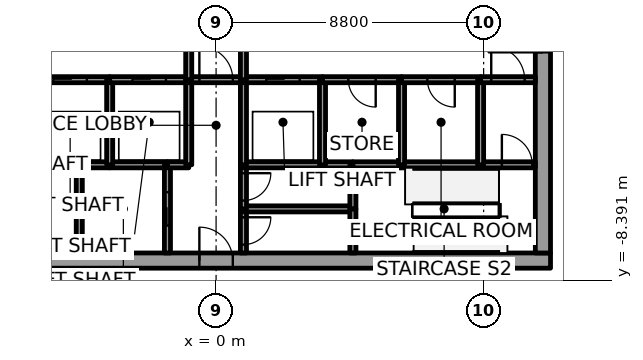
"""IFC4 building model, lengths in metres.
Left out: names, types, materials, properties, quantities, classifications, styles, units other than length and angle.
Written with IfcOpenShell. Run it as: python <this file> out.ifc"""

import sys

from ifc_helpers import new_model, si_unit, direction, frame, frame_2d, origin, place, context, subcontext, project, spatial, rectangle, extrude, element, fill, save


model = new_model("IFC4")
c1 = context("Model", 3, precision=1e-05, world=origin(), true_north=direction((0.0, 1.0)))
c2 = subcontext(c1, "Body", "Model", "MODEL_VIEW")
j1 = project(units=[si_unit("LENGTHUNIT", "METRE"), si_unit("PLANEANGLEUNIT", "RADIAN")], contexts=[c1])
p1 = place(None, origin())
s1 = spatial("IfcSite", under=j1, at=p1, CompositionType="ELEMENT")
p2 = place(p1, origin())
s2 = spatial("IfcBuilding", under=s1, at=p2, CompositionType="ELEMENT")
p3 = place(p2, frame((0.0, 0.0, 9.0)))
s3 = spatial("IfcBuildingStorey", under=s2, at=p3, CompositionType="ELEMENT", Elevation=9.0)
p4 = place(p3, frame((-11.0, -7.75, 0.0), z_axis=(0.0, 0.0, 1.0), x_axis=(1.0, 0.0, 0.0)))
e1 = element("IfcWall", 1, at=p4, inside=s3, PredefinedType="SHEAR", context=c2, shape_type="SweptSolid", body=[
    extrude(rectangle(XDim=22.0, YDim=0.5, at=frame_2d((11.0, 0.0))), origin(), (0.0, 0.0, 1.0), 7.8),
])
p5 = place(p4, frame((10.45, 0.0, 0.0)))
e2 = element("IfcOpeningElement", 2, at=p5, cuts=e1, PredefinedType="OPENING", context=c2, shape_type="SweptSolid", body=[
    extrude(rectangle(XDim=1.1, YDim=2.1, at=frame_2d((0.55, 1.05))), frame((0.0, 0.25, 0.0), z_axis=(0.0, -1.0, 0.0), x_axis=(1.0, 0.0, 0.0)), (0.0, 0.0, 1.0), 0.5),
])
p6 = place(p3, frame((10.75, -7.5, 0.0), z_axis=(0.0, 0.0, 1.0), x_axis=(0.0, 1.0, 0.0)))
e3 = element("IfcWall", 3, at=p6, inside=s3, PredefinedType="SHEAR", context=c2, shape_type="SweptSolid", body=[
    extrude(rectangle(XDim=15.0, YDim=0.5, at=frame_2d((7.5, 0.0))), origin(), (0.0, 0.0, 1.0), 7.8),
])
p7 = place(p6, frame((6.6, 0.0, 0.0)))
e4 = element("IfcOpeningElement", 4, at=p7, cuts=e3, PredefinedType="OPENING", context=c2, shape_type="SweptSolid", body=[
    extrude(rectangle(XDim=1.8, YDim=2.1, at=frame_2d((0.9, 1.05))), frame((0.0, 0.25, 0.0), z_axis=(0.0, -1.0, 0.0), x_axis=(1.0, 0.0, 0.0)), (0.0, 0.0, 1.0), 0.5),
])
p8 = place(p3, frame((-6.1, -4.6, 0.0), z_axis=(0.0, 0.0, 1.0), x_axis=(1.0, 0.0, 0.0)))
e5 = element("IfcWall", 5, at=p8, inside=s3, PredefinedType="SOLIDWALL", context=c2, shape_type="SweptSolid", body=[
    extrude(rectangle(XDim=1.6, YDim=0.2, at=frame_2d((0.8, 0.0))), origin(), (0.0, 0.0, 1.0), 7.55),
])
p9 = place(p3, frame((-6.1, -1.8, 0.0), z_axis=(0.0, 0.0, 1.0), x_axis=(1.0, 0.0, 0.0)))
e6 = element("IfcWall", 6, at=p9, inside=s3, PredefinedType="SOLIDWALL", context=c2, shape_type="SweptSolid", body=[
    extrude(rectangle(XDim=2.6, YDim=0.2, at=frame_2d((1.3, 0.0))), origin(), (0.0, 0.0, 1.0), 7.55),
])
p10 = place(p9, frame((0.75, 0.0, 0.0)))
e7 = element("IfcOpeningElement", 7, at=p10, cuts=e6, PredefinedType="OPENING", context=c2, shape_type="SweptSolid", body=[
    extrude(rectangle(XDim=1.1, YDim=2.1, at=frame_2d((0.55, 1.05))), frame((0.0, 0.1, 0.0), z_axis=(0.0, -1.0, 0.0), x_axis=(1.0, 0.0, 0.0)), (0.0, 0.0, 1.0), 0.2),
])
p11 = place(p3, frame((-4.5, -4.6, 0.0), z_axis=(0.0, 0.0, 1.0), x_axis=(0.0, -1.0, 0.0)))
e8 = element("IfcWall", 8, at=p11, inside=s3, PredefinedType="SOLIDWALL", context=c2, shape_type="SweptSolid", body=[
    extrude(rectangle(XDim=2.9, YDim=0.2, at=frame_2d((1.45, 0.0))), origin(), (0.0, 0.0, 1.0), 7.55),
])
p12 = place(p3, frame((-4.5, -4.6, 0.0), z_axis=(0.0, 0.0, 1.0), x_axis=(1.0, 0.0, 0.0)))
e9 = element("IfcWall", 9, at=p12, inside=s3, PredefinedType="SOLIDWALL", context=c2, shape_type="SweptSolid", body=[
    extrude(rectangle(XDim=1.0, YDim=0.2, at=frame_2d((0.5, 0.0))), origin(), (0.0, 0.0, 1.0), 7.55),
])
p13 = place(p3, frame((-3.5, -4.6, 0.0), z_axis=(0.0, 0.0, 1.0), x_axis=(1.0, 0.0, 0.0)))
e10 = element("IfcWall", 10, at=p13, inside=s3, PredefinedType="SOLIDWALL", context=c2, shape_type="SweptSolid", body=[
    extrude(rectangle(XDim=1.9, YDim=0.2, at=frame_2d((0.95, 0.0))), origin(), (0.0, 0.0, 1.0), 7.55),
])
p14 = place(p3, frame((-3.5, -4.6, 0.0), z_axis=(0.0, 0.0, 1.0), x_axis=(0.0, 1.0, 0.0)))
e11 = element("IfcWall", 11, at=p14, inside=s3, PredefinedType="SOLIDWALL", context=c2, shape_type="SweptSolid", body=[
    extrude(rectangle(XDim=2.8, YDim=0.2, at=frame_2d((1.4, 0.0))), origin(), (0.0, 0.0, 1.0), 7.55),
])
p15 = place(p3, frame((-3.5, -1.8, 0.0), z_axis=(0.0, 0.0, 1.0), x_axis=(1.0, 0.0, 0.0)))
e12 = element("IfcWall", 12, at=p15, inside=s3, PredefinedType="SOLIDWALL", context=c2, shape_type="SweptSolid", body=[
    extrude(rectangle(XDim=2.6, YDim=0.2, at=frame_2d((1.3, 0.0))), origin(), (0.0, 0.0, 1.0), 7.55),
])
p16 = place(p15, frame((0.75, 0.0, 0.0)))
e13 = element("IfcOpeningElement", 13, at=p16, cuts=e12, PredefinedType="OPENING", context=c2, shape_type="SweptSolid", body=[
    extrude(rectangle(XDim=1.1, YDim=2.1, at=frame_2d((0.55, 1.05))), frame((0.0, 0.1, 0.0), z_axis=(0.0, -1.0, 0.0), x_axis=(1.0, 0.0, 0.0)), (0.0, 0.0, 1.0), 0.2),
])
p17 = place(p3, frame((-1.6, -7.5, 0.0), z_axis=(0.0, 0.0, 1.0), x_axis=(0.0, 1.0, 0.0)))
e14 = element("IfcWall", 14, at=p17, inside=s3, PredefinedType="SOLIDWALL", context=c2, shape_type="SweptSolid", body=[
    extrude(rectangle(XDim=2.9, YDim=0.2, at=frame_2d((1.45, 0.0))), origin(), (0.0, 0.0, 1.0), 7.55),
])
p18 = place(p17, frame((0.9, 0.0, 0.0)))
e15 = element("IfcOpeningElement", 15, at=p18, cuts=e14, PredefinedType="OPENING", context=c2, shape_type="SweptSolid", body=[
    extrude(rectangle(XDim=1.1, YDim=2.1, at=frame_2d((0.55, 1.05))), frame((0.0, 0.1, 0.0), z_axis=(0.0, -1.0, 0.0), x_axis=(1.0, 0.0, 0.0)), (0.0, 0.0, 1.0), 0.2),
])
p19 = place(p3, frame((-1.6, -4.6, 0.0), z_axis=(0.0, 0.0, 1.0), x_axis=(1.0, 0.0, 0.0)))
e16 = element("IfcWall", 16, at=p19, inside=s3, PredefinedType="SOLIDWALL", context=c2, shape_type="SweptSolid", body=[
    extrude(rectangle(XDim=0.7, YDim=0.2, at=frame_2d((0.35, 0.0))), origin(), (0.0, 0.0, 1.0), 7.55),
])
p20 = place(p3, frame((-0.9, -4.6, 0.0), z_axis=(0.0, 0.0, 1.0), x_axis=(0.0, 1.0, 0.0)))
e17 = element("IfcWall", 17, at=p20, inside=s3, PredefinedType="SOLIDWALL", context=c2, shape_type="SweptSolid", body=[
    extrude(rectangle(XDim=2.8, YDim=0.2, at=frame_2d((1.4, 0.0))), origin(), (0.0, 0.0, 1.0), 7.55),
])
p21 = place(p3, frame((-0.9, -1.8, 0.0), z_axis=(0.0, 0.0, 1.0), x_axis=(1.0, 0.0, 0.0)))
e18 = element("IfcWall", 18, at=p21, inside=s3, PredefinedType="SOLIDWALL", context=c2, shape_type="SweptSolid", body=[
    extrude(rectangle(XDim=1.8, YDim=0.2, at=frame_2d((0.9, 0.0))), origin(), (0.0, 0.0, 1.0), 7.55),
])
p22 = place(p21, frame((0.35, 0.0, 0.0)))
e19 = element("IfcOpeningElement", 19, at=p22, cuts=e18, PredefinedType="OPENING", context=c2, shape_type="SweptSolid", body=[
    extrude(rectangle(XDim=1.1, YDim=2.4, at=frame_2d((0.55, 1.2))), frame((0.0, 0.1, 0.0), z_axis=(0.0, -1.0, 0.0), x_axis=(1.0, 0.0, 0.0)), (0.0, 0.0, 1.0), 0.2),
])
p23 = place(p3, frame((-0.9, 1.8, 0.0), z_axis=(0.0, 0.0, 1.0), x_axis=(0.0, -1.0, 0.0)))
e20 = element("IfcWall", 20, at=p23, inside=s3, PredefinedType="SOLIDWALL", context=c2, shape_type="SweptSolid", body=[
    extrude(rectangle(XDim=3.6, YDim=0.2, at=frame_2d((1.8, 0.0))), origin(), (0.0, 0.0, 1.0), 7.55),
])
p24 = place(p23, frame((1.05, 0.0, 0.0)))
e21 = element("IfcOpeningElement", 21, at=p24, cuts=e20, PredefinedType="OPENING", context=c2, shape_type="SweptSolid", body=[
    extrude(rectangle(XDim=1.5, YDim=2.4, at=frame_2d((0.75, 1.2))), frame((0.0, 0.1, 0.0), z_axis=(0.0, -1.0, 0.0), x_axis=(1.0, 0.0, 0.0)), (0.0, 0.0, 1.0), 0.2),
])
p25 = place(p3, frame((0.9, -6.05, 0.0), z_axis=(0.0, 0.0, 1.0), x_axis=(0.0, -1.0, 0.0)))
e22 = element("IfcWall", 22, at=p25, inside=s3, PredefinedType="SOLIDWALL", context=c2, shape_type="SweptSolid", body=[
    extrude(rectangle(XDim=1.45, YDim=0.2, at=frame_2d((0.725, 0.0))), origin(), (0.0, 0.0, 1.0), 7.55),
])
p26 = place(p25, frame((0.275, 0.0, 0.0)))
e23 = element("IfcOpeningElement", 23, at=p26, cuts=e22, PredefinedType="OPENING", context=c2, shape_type="SweptSolid", body=[
    extrude(rectangle(XDim=0.9, YDim=2.4, at=frame_2d((0.45, 1.2))), frame((0.0, 0.1, 0.0), z_axis=(0.0, -1.0, 0.0), x_axis=(1.0, 0.0, 0.0)), (0.0, 0.0, 1.0), 0.2),
])
p27 = place(p3, frame((4.5, -6.05, 0.0), z_axis=(0.0, 0.0, 1.0), x_axis=(-1.0, 0.0, 0.0)))
e24 = element("IfcWall", 24, at=p27, inside=s3, PredefinedType="SOLIDWALL", context=c2, shape_type="SweptSolid", body=[
    extrude(rectangle(XDim=3.6, YDim=0.2, at=frame_2d((1.8, 0.0))), origin(), (0.0, 0.0, 1.0), 7.55),
])
p28 = place(p3, frame((0.9, -4.6, 0.0), z_axis=(0.0, 0.0, 1.0), x_axis=(0.0, -1.0, 0.0)))
e25 = element("IfcWall", 25, at=p28, inside=s3, PredefinedType="SOLIDWALL", context=c2, shape_type="SweptSolid", body=[
    extrude(rectangle(XDim=1.45, YDim=0.2, at=frame_2d((0.725, 0.0))), origin(), (0.0, 0.0, 1.0), 7.55),
])
p29 = place(p28, frame((0.275, 0.0, 0.0)))
e26 = element("IfcOpeningElement", 26, at=p29, cuts=e25, PredefinedType="OPENING", context=c2, shape_type="SweptSolid", body=[
    extrude(rectangle(XDim=0.9, YDim=2.4, at=frame_2d((0.45, 1.2))), frame((0.0, 0.1, 0.0), z_axis=(0.0, -1.0, 0.0), x_axis=(1.0, 0.0, 0.0)), (0.0, 0.0, 1.0), 0.2),
])
p30 = place(p3, frame((3.5, -4.6, 0.0), z_axis=(0.0, 0.0, 1.0), x_axis=(-1.0, 0.0, 0.0)))
e27 = element("IfcWall", 27, at=p30, inside=s3, PredefinedType="SOLIDWALL", context=c2, shape_type="SweptSolid", body=[
    extrude(rectangle(XDim=2.6, YDim=0.2, at=frame_2d((1.3, 0.0))), origin(), (0.0, 0.0, 1.0), 7.55),
])
p31 = place(p3, frame((0.9, -1.8, 0.0), z_axis=(0.0, 0.0, 1.0), x_axis=(0.0, -1.0, 0.0)))
e28 = element("IfcWall", 28, at=p31, inside=s3, PredefinedType="SOLIDWALL", context=c2, shape_type="SweptSolid", body=[
    extrude(rectangle(XDim=2.8, YDim=0.2, at=frame_2d((1.4, 0.0))), origin(), (0.0, 0.0, 1.0), 7.55),
])
p32 = place(p3, frame((0.9, -1.8, 0.0), z_axis=(0.0, 0.0, 1.0), x_axis=(1.0, 0.0, 0.0)))
e29 = element("IfcWall", 29, at=p32, inside=s3, PredefinedType="SOLIDWALL", context=c2, shape_type="SweptSolid", body=[
    extrude(rectangle(XDim=2.6, YDim=0.2, at=frame_2d((1.3, 0.0))), origin(), (0.0, 0.0, 1.0), 7.55),
])
p33 = place(p32, frame((0.75, 0.0, 0.0)))
e30 = element("IfcOpeningElement", 30, at=p33, cuts=e29, PredefinedType="OPENING", context=c2, shape_type="SweptSolid", body=[
    extrude(rectangle(XDim=1.1, YDim=2.1, at=frame_2d((0.55, 1.05))), frame((0.0, 0.1, 0.0), z_axis=(0.0, -1.0, 0.0), x_axis=(1.0, 0.0, 0.0)), (0.0, 0.0, 1.0), 0.2),
])
p34 = place(p3, frame((0.9, -1.8, 0.0), z_axis=(0.0, 0.0, 1.0), x_axis=(0.0, 1.0, 0.0)))
e31 = element("IfcWall", 31, at=p34, inside=s3, PredefinedType="SOLIDWALL", context=c2, shape_type="SweptSolid", body=[
    extrude(rectangle(XDim=3.6, YDim=0.2, at=frame_2d((1.8, 0.0))), origin(), (0.0, 0.0, 1.0), 7.55),
])
p35 = place(p34, frame((1.05, 0.0, 0.0)))
e32 = element("IfcOpeningElement", 32, at=p35, cuts=e31, PredefinedType="OPENING", context=c2, shape_type="SweptSolid", body=[
    extrude(rectangle(XDim=1.5, YDim=2.4, at=frame_2d((0.75, 1.2))), frame((0.0, 0.1, 0.0), z_axis=(0.0, -1.0, 0.0), x_axis=(1.0, 0.0, 0.0)), (0.0, 0.0, 1.0), 0.2),
])
p36 = place(p3, frame((3.5, -4.6, 0.0), z_axis=(0.0, 0.0, 1.0), x_axis=(1.0, 0.0, 0.0)))
e33 = element("IfcWall", 33, at=p36, inside=s3, PredefinedType="SOLIDWALL", context=c2, shape_type="SweptSolid", body=[
    extrude(rectangle(XDim=1.0, YDim=0.2, at=frame_2d((0.5, 0.0))), origin(), (0.0, 0.0, 1.0), 7.55),
])
p37 = place(p3, frame((3.5, -1.8, 0.0), z_axis=(0.0, 0.0, 1.0), x_axis=(0.0, -1.0, 0.0)))
e34 = element("IfcWall", 34, at=p37, inside=s3, PredefinedType="SOLIDWALL", context=c2, shape_type="SweptSolid", body=[
    extrude(rectangle(XDim=2.8, YDim=0.2, at=frame_2d((1.4, 0.0))), origin(), (0.0, 0.0, 1.0), 7.55),
])
p38 = place(p3, frame((6.1, -1.8, 0.0), z_axis=(0.0, 0.0, 1.0), x_axis=(-1.0, 0.0, 0.0)))
e35 = element("IfcWall", 35, at=p38, inside=s3, PredefinedType="SOLIDWALL", context=c2, shape_type="SweptSolid", body=[
    extrude(rectangle(XDim=2.6, YDim=0.2, at=frame_2d((1.3, 0.0))), origin(), (0.0, 0.0, 1.0), 7.55),
])
p39 = place(p38, frame((0.85, 0.0, 0.0)))
e36 = element("IfcOpeningElement", 36, at=p39, cuts=e35, PredefinedType="OPENING", context=c2, shape_type="SweptSolid", body=[
    extrude(rectangle(XDim=0.9, YDim=2.4, at=frame_2d((0.45, 1.2))), frame((0.0, 0.1, 0.0), z_axis=(0.0, -1.0, 0.0), x_axis=(1.0, 0.0, 0.0)), (0.0, 0.0, 1.0), 0.2),
])
for number, where, z_axis, x_axis in (
    (37, (4.5, -7.5, 0.0), (0.0, 0.0, 1.0), (0.0, 1.0, 0.0)),
    (38, (4.5, -6.05, 0.0), (0.0, 0.0, 1.0), (0.0, 1.0, 0.0)),
):
    element("IfcWall", number, at=place(p3, frame(where, z_axis=z_axis, x_axis=x_axis)), inside=s3, PredefinedType="SOLIDWALL", context=c2, shape_type="SweptSolid", body=[
        extrude(rectangle(XDim=1.45, YDim=0.2, at=frame_2d((0.725, 0.0))), origin(), (0.0, 0.0, 1.0), 7.55),
    ])
p40 = place(p3, frame((4.5, -4.6, 0.0), z_axis=(0.0, 0.0, 1.0), x_axis=(1.0, 0.0, 0.0)))
e39 = element("IfcWall", 39, at=p40, inside=s3, PredefinedType="SOLIDWALL", context=c2, shape_type="SweptSolid", body=[
    extrude(rectangle(XDim=1.6, YDim=0.2, at=frame_2d((0.8, 0.0))), origin(), (0.0, 0.0, 1.0), 7.55),
])
p41 = place(p3, frame((6.1, -4.6, 0.0), z_axis=(0.0, 0.0, 1.0), x_axis=(1.0, 0.0, 0.0)))
e40 = element("IfcWall", 40, at=p41, inside=s3, PredefinedType="SOLIDWALL", context=c2, shape_type="SweptSolid", body=[
    extrude(rectangle(XDim=2.6, YDim=0.2, at=frame_2d((1.3, 0.0))), origin(), (0.0, 0.0, 1.0), 7.55),
])
p42 = place(p3, frame((6.1, -4.6, 0.0), z_axis=(0.0, 0.0, 1.0), x_axis=(0.0, 1.0, 0.0)))
e41 = element("IfcWall", 41, at=p42, inside=s3, PredefinedType="SOLIDWALL", context=c2, shape_type="SweptSolid", body=[
    extrude(rectangle(XDim=2.8, YDim=0.2, at=frame_2d((1.4, 0.0))), origin(), (0.0, 0.0, 1.0), 7.55),
])
p43 = place(p3, frame((8.7, -1.8, 0.0), z_axis=(0.0, 0.0, 1.0), x_axis=(-1.0, 0.0, 0.0)))
e42 = element("IfcWall", 42, at=p43, inside=s3, PredefinedType="SOLIDWALL", context=c2, shape_type="SweptSolid", body=[
    extrude(rectangle(XDim=2.6, YDim=0.2, at=frame_2d((1.3, 0.0))), origin(), (0.0, 0.0, 1.0), 7.55),
])
p44 = place(p43, frame((0.85, 0.0, 0.0)))
e43 = element("IfcOpeningElement", 43, at=p44, cuts=e42, PredefinedType="OPENING", context=c2, shape_type="SweptSolid", body=[
    extrude(rectangle(XDim=0.9, YDim=2.4, at=frame_2d((0.45, 1.2))), frame((0.0, 0.1, 0.0), z_axis=(0.0, -1.0, 0.0), x_axis=(1.0, 0.0, 0.0)), (0.0, 0.0, 1.0), 0.2),
])
p45 = place(p3, frame((8.7, -4.6, 0.0), z_axis=(0.0, 0.0, 1.0), x_axis=(1.0, 0.0, 0.0)))
e44 = element("IfcWall", 44, at=p45, inside=s3, PredefinedType="SOLIDWALL", context=c2, shape_type="SweptSolid", body=[
    extrude(rectangle(XDim=1.8, YDim=0.2, at=frame_2d((0.9, 0.0))), origin(), (0.0, 0.0, 1.0), 7.55),
])
p46 = place(p45, frame((0.7, 0.0, 0.0)))
e45 = element("IfcOpeningElement", 45, at=p46, cuts=e44, PredefinedType="OPENING", context=c2, shape_type="SweptSolid", body=[
    extrude(rectangle(XDim=1.0, YDim=2.1, at=frame_2d((0.5, 1.05))), frame((0.0, 0.1, 0.0), z_axis=(0.0, -1.0, 0.0), x_axis=(1.0, 0.0, 0.0)), (0.0, 0.0, 1.0), 0.2),
])
p47 = place(p3, frame((8.7, -4.6, 0.0), z_axis=(0.0, 0.0, 1.0), x_axis=(0.0, 1.0, 0.0)))
e46 = element("IfcWall", 46, at=p47, inside=s3, PredefinedType="SOLIDWALL", context=c2, shape_type="SweptSolid", body=[
    extrude(rectangle(XDim=2.8, YDim=0.2, at=frame_2d((1.4, 0.0))), origin(), (0.0, 0.0, 1.0), 7.55),
])
p48 = place(p3, frame((8.7, -1.8, 0.0), z_axis=(0.0, 0.0, 1.0), x_axis=(1.0, 0.0, 0.0)))
e47 = element("IfcWall", 47, at=p48, inside=s3, PredefinedType="SOLIDWALL", context=c2, shape_type="SweptSolid", body=[
    extrude(rectangle(XDim=1.8, YDim=0.2, at=frame_2d((0.9, 0.0))), origin(), (0.0, 0.0, 1.0), 7.55),
])
p49 = place(p48, frame((0.35, 0.0, 0.0)))
e48 = element("IfcOpeningElement", 48, at=p49, cuts=e47, PredefinedType="OPENING", context=c2, shape_type="SweptSolid", body=[
    extrude(rectangle(XDim=1.1, YDim=2.4, at=frame_2d((0.55, 1.2))), frame((0.0, 0.1, 0.0), z_axis=(0.0, -1.0, 0.0), x_axis=(1.0, 0.0, 0.0)), (0.0, 0.0, 1.0), 0.2),
])
p50 = place(p10, origin())
e49 = element("IfcDoor", 49, at=p50, inside=s3, OperationType="SLIDING_TO_LEFT", PredefinedType="DOOR", context=c2, shape_type="SweptSolid", body=[
    extrude(rectangle(XDim=1.1, YDim=2.1, at=frame_2d((0.55, 1.05))), frame((0.0, 0.025, 0.0), z_axis=(0.0, -1.0, 0.0), x_axis=(1.0, 0.0, 0.0)), (0.0, 0.0, 1.0), 0.05),
])
fill(e7, e49)
p51 = place(p16, origin())
e50 = element("IfcDoor", 50, at=p51, inside=s3, OperationType="SLIDING_TO_RIGHT", PredefinedType="DOOR", context=c2, shape_type="SweptSolid", body=[
    extrude(rectangle(XDim=1.1, YDim=2.1, at=frame_2d((0.55, 1.05))), frame((0.0, 0.025, 0.0), z_axis=(0.0, -1.0, 0.0), x_axis=(1.0, 0.0, 0.0)), (0.0, 0.0, 1.0), 0.05),
])
fill(e13, e50)
p52 = place(p33, origin())
e51 = element("IfcDoor", 51, at=p52, inside=s3, OperationType="SLIDING_TO_LEFT", PredefinedType="DOOR", context=c2, shape_type="SweptSolid", body=[
    extrude(rectangle(XDim=1.1, YDim=2.1, at=frame_2d((0.55, 1.05))), frame((0.0, 0.025, 0.0), z_axis=(0.0, -1.0, 0.0), x_axis=(1.0, 0.0, 0.0)), (0.0, 0.0, 1.0), 0.05),
])
fill(e30, e51)
p53 = place(p18, origin())
e52 = element("IfcDoor", 52, at=p53, inside=s3, OperationType="SLIDING_TO_RIGHT", PredefinedType="DOOR", context=c2, shape_type="SweptSolid", body=[
    extrude(rectangle(XDim=1.1, YDim=2.1, at=frame_2d((0.55, 1.05))), frame((0.0, 0.025, 0.0), z_axis=(0.0, -1.0, 0.0), x_axis=(1.0, 0.0, 0.0)), (0.0, 0.0, 1.0), 0.05),
])
fill(e15, e52)
p54 = place(p49, origin())
e53 = element("IfcDoor", 53, at=p54, inside=s3, OperationType="SINGLE_SWING_RIGHT", PredefinedType="DOOR", context=c2, shape_type="SweptSolid", body=[
    extrude(rectangle(XDim=1.1, YDim=2.4, at=frame_2d((0.55, 1.2))), frame((0.0, 0.025, 0.0), z_axis=(0.0, -1.0, 0.0), x_axis=(1.0, 0.0, 0.0)), (0.0, 0.0, 1.0), 0.05),
])
fill(e48, e53)
p55 = place(p22, origin())
e54 = element("IfcDoor", 54, at=p55, inside=s3, OperationType="SINGLE_SWING_RIGHT", PredefinedType="DOOR", context=c2, shape_type="SweptSolid", body=[
    extrude(rectangle(XDim=1.1, YDim=2.4, at=frame_2d((0.55, 1.2))), frame((0.0, 0.025, 0.0), z_axis=(0.0, -1.0, 0.0), x_axis=(1.0, 0.0, 0.0)), (0.0, 0.0, 1.0), 0.05),
])
fill(e19, e54)
p56 = place(p46, origin())
e55 = element("IfcDoor", 55, at=p56, inside=s3, OperationType="SINGLE_SWING_RIGHT", PredefinedType="DOOR", context=c2, shape_type="SweptSolid", body=[
    extrude(rectangle(XDim=1.0, YDim=2.1, at=frame_2d((0.5, 1.05))), frame((0.0, 0.025, 0.0), z_axis=(0.0, -1.0, 0.0), x_axis=(1.0, 0.0, 0.0)), (0.0, 0.0, 1.0), 0.05),
])
fill(e45, e55)
p57 = place(p39, origin())
e56 = element("IfcDoor", 56, at=p57, inside=s3, OperationType="SINGLE_SWING_LEFT", PredefinedType="DOOR", context=c2, shape_type="SweptSolid", body=[
    extrude(rectangle(XDim=0.9, YDim=2.4, at=frame_2d((0.45, 1.2))), frame((0.0, 0.025, 0.0), z_axis=(0.0, -1.0, 0.0), x_axis=(1.0, 0.0, 0.0)), (0.0, 0.0, 1.0), 0.05),
])
fill(e36, e56)
p58 = place(p44, origin())
e57 = element("IfcDoor", 57, at=p58, inside=s3, OperationType="SINGLE_SWING_RIGHT", PredefinedType="DOOR", context=c2, shape_type="SweptSolid", body=[
    extrude(rectangle(XDim=0.9, YDim=2.4, at=frame_2d((0.45, 1.2))), frame((0.0, 0.025, 0.0), z_axis=(0.0, -1.0, 0.0), x_axis=(1.0, 0.0, 0.0)), (0.0, 0.0, 1.0), 0.05),
])
fill(e43, e57)
p59 = place(p26, origin())
e58 = element("IfcDoor", 58, at=p59, inside=s3, OperationType="SINGLE_SWING_LEFT", PredefinedType="DOOR", context=c2, shape_type="SweptSolid", body=[
    extrude(rectangle(XDim=0.9, YDim=2.4, at=frame_2d((0.45, 1.2))), frame((0.0, 0.025, 0.0), z_axis=(0.0, -1.0, 0.0), x_axis=(1.0, 0.0, 0.0)), (0.0, 0.0, 1.0), 0.05),
])
fill(e23, e58)
p60 = place(p29, origin())
e59 = element("IfcDoor", 59, at=p60, inside=s3, OperationType="SINGLE_SWING_RIGHT", PredefinedType="DOOR", context=c2, shape_type="SweptSolid", body=[
    extrude(rectangle(XDim=0.9, YDim=2.4, at=frame_2d((0.45, 1.2))), frame((0.0, 0.025, 0.0), z_axis=(0.0, -1.0, 0.0), x_axis=(1.0, 0.0, 0.0)), (0.0, 0.0, 1.0), 0.05),
])
fill(e26, e59)
p61 = place(p7, origin())
e60 = element("IfcDoor", 60, at=p61, inside=s3, OperationType="DOUBLE_DOOR_SINGLE_SWING", PredefinedType="DOOR", context=c2, shape_type="SweptSolid", body=[
    extrude(rectangle(XDim=1.8, YDim=2.1, at=frame_2d((0.9, 1.05))), frame((0.0, 0.025, 0.0), z_axis=(0.0, -1.0, 0.0), x_axis=(1.0, 0.0, 0.0)), (0.0, 0.0, 1.0), 0.05),
])
fill(e4, e60)
p62 = place(p5, origin())
e61 = element("IfcDoor", 61, at=p62, inside=s3, OperationType="SINGLE_SWING_LEFT", PredefinedType="DOOR", context=c2, shape_type="SweptSolid", body=[
    extrude(rectangle(XDim=1.1, YDim=2.1, at=frame_2d((0.55, 1.05))), frame((0.0, 0.025, 0.0), z_axis=(0.0, -1.0, 0.0), x_axis=(1.0, 0.0, 0.0)), (0.0, 0.0, 1.0), 0.05),
])
fill(e2, e61)
save(model, sys.argv[1])
